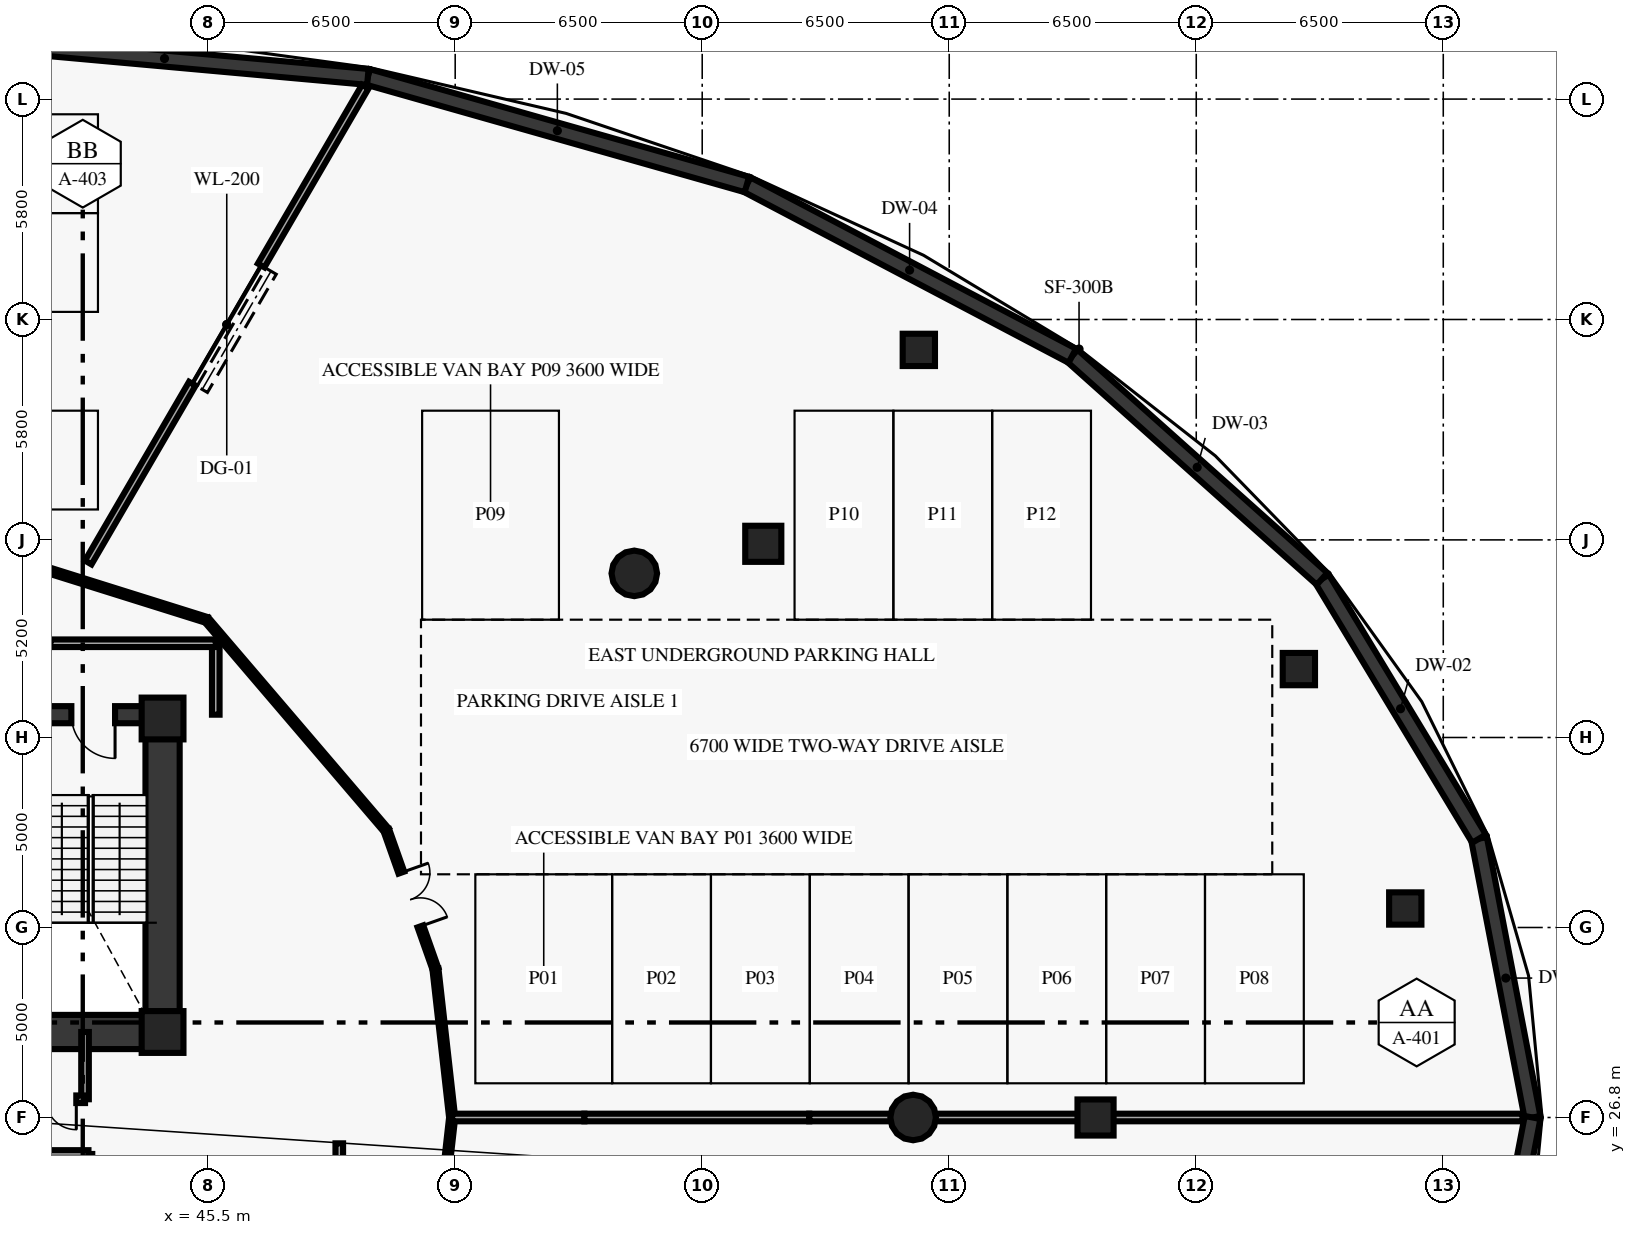
"""IFC4 building model, lengths in metres.
Left out: names, types, materials, properties, quantities, classifications, styles, units other than length and angle.
Written with IfcOpenShell. Run it as: python <this file> out.ifc"""

import sys

from ifc_helpers import new_model, si_unit, direction, frame, frame_2d, origin, origin_2d, place, context, subcontext, project, spatial, rectangle, circle, extrude, element, fill, save


model = new_model("IFC4")
c1 = context("Model", 3, precision=1e-05, world=origin(), true_north=direction((0.0, 1.0)))
c2 = subcontext(c1, "Body", "Model", "MODEL_VIEW")
j1 = project(units=[si_unit("LENGTHUNIT", "METRE"), si_unit("PLANEANGLEUNIT", "RADIAN")], contexts=[c1])
p1 = place(None, origin())
s1 = spatial("IfcSite", under=j1, at=p1, CompositionType="ELEMENT")
p2 = place(p1, origin())
s2 = spatial("IfcBuilding", under=s1, at=p2, CompositionType="ELEMENT")
p3 = place(p2, frame((0.0, 0.0, -4.5)))
s3 = spatial("IfcBuildingStorey", under=s2, at=p3, CompositionType="ELEMENT", Elevation=-4.5)
for number, where, z_axis, x_axis in (
    (1, (44.3, 29.05, 0.0), (0.0, 0.0, 1.0), (1.0, 0.0, 0.0)),
    (2, (44.3, 37.3, 0.0), (0.0, 0.0, 1.0), (1.0, 0.0, 0.0)),
):
    element("IfcColumn", number, at=place(p3, frame(where, z_axis=z_axis, x_axis=x_axis)), inside=s3, PredefinedType="PILASTER", context=c2, shape_type="SweptSolid", body=[
        extrude(rectangle(XDim=1.1, YDim=1.1, at=origin_2d()), origin(), (0.0, 0.0, 1.0), 4.18),
    ])
for number, where, z_axis, x_axis in (
    (3, (64.05, 26.8, 0.0), (0.0, 0.0, 1.0), (1.0, 0.0, 0.0)),
    (4, (56.713, 41.119, 0.0), (0.0, 0.0, 1.0), (1.0, 0.0, 0.0)),
):
    element("IfcColumn", number, at=place(p3, frame(where, z_axis=z_axis, x_axis=x_axis)), inside=s3, PredefinedType="COLUMN", context=c2, shape_type="SweptSolid", body=[
        extrude(circle(Radius=0.6, at=origin_2d()), origin(), (0.0, 0.0, 1.0), 4.18),
    ])
for number, where, z_axis, x_axis in (
    (5, (68.85, 26.8, 0.0), (0.0, 0.0, 1.0), (1.0, 0.0, 0.0)),
    (6, (60.107, 41.897, 0.0), (0.0, 0.0, 1.0), (1.0, 0.0, 0.0)),
):
    element("IfcColumn", number, at=place(p3, frame(where, z_axis=z_axis, x_axis=x_axis)), inside=s3, PredefinedType="COLUMN", context=c2, shape_type="SweptSolid", body=[
        extrude(rectangle(XDim=0.95, YDim=0.95, at=origin_2d()), origin(), (0.0, 0.0, 1.0), 4.18),
    ])
for number, where, z_axis, x_axis in (
    (7, (77.0, 32.3, 0.0), (0.0, 0.0, 1.0), (1.0, 0.0, 0.0)),
    (8, (74.2, 38.6, 0.0), (0.0, 0.0, 1.0), (1.0, 0.0, 0.0)),
    (9, (64.2, 47.0, 0.0), (0.0, 0.0, 1.0), (1.0, 0.0, 0.0)),
):
    element("IfcColumn", number, at=place(p3, frame(where, z_axis=z_axis, x_axis=x_axis)), inside=s3, PredefinedType="COLUMN", context=c2, shape_type="SweptSolid", body=[
        extrude(rectangle(XDim=0.85, YDim=0.85, at=origin_2d()), origin(), (0.0, 0.0, 1.0), 4.18),
    ])
p4 = place(p3, frame((44.3, 29.05, 0.0), z_axis=(0.0, 0.0, 1.0), x_axis=(0.0, 1.0, 0.0)))
e10 = element("IfcWall", 10, at=p4, inside=s3, PredefinedType="SHEAR", context=c2, shape_type="SweptSolid", body=[
    extrude(rectangle(XDim=8.35, YDim=0.9, at=frame_2d((4.175, 0.0))), origin(), (0.0, 0.0, 1.0), 4.18),
])
p5 = place(p3, frame((33.7, 29.05, 0.0), z_axis=(0.0, 0.0, 1.0), x_axis=(1.0, 0.0, 0.0)))
e11 = element("IfcWall", 11, at=p5, inside=s3, PredefinedType="SHEAR", context=c2, shape_type="SweptSolid", body=[
    extrude(rectangle(XDim=10.6, YDim=0.9, at=frame_2d((5.3, 0.0))), origin(), (0.0, 0.0, 1.0), 4.18),
])
p6 = place(p3, frame((80.35, 26.8, 0.0), z_axis=(0.0, 0.0, 1.0), x_axis=(-0.188595316219, 0.982054889861, 0.0)))
e12 = element("IfcWall", 12, at=p6, inside=s3, PredefinedType="SHEAR", context=c2, shape_type="SweptSolid", body=[
    extrude(rectangle(XDim=7.472, YDim=0.42, at=frame_2d((3.736, 0.0))), origin(), (0.0, 0.0, 1.0), 4.18),
])
p7 = place(p3, frame((78.941, 34.138, 0.0), z_axis=(0.0, 0.0, 1.0), x_axis=(-0.517122636798, 0.85591131463, 0.0)))
e13 = element("IfcWall", 13, at=p7, inside=s3, PredefinedType="SHEAR", context=c2, shape_type="SweptSolid", body=[
    extrude(rectangle(XDim=7.988, YDim=0.42, at=frame_2d((3.994, 0.0))), origin(), (0.0, 0.0, 1.0), 4.18),
])
p8 = place(p3, frame((74.81, 40.975, 0.0), z_axis=(0.0, 0.0, 1.0), x_axis=(-0.745720826992, 0.666258544554, 0.0)))
e14 = element("IfcWall", 14, at=p8, inside=s3, PredefinedType="SHEAR", context=c2, shape_type="SweptSolid", body=[
    extrude(rectangle(XDim=8.812, YDim=0.42, at=frame_2d((4.406, 0.0))), origin(), (0.0, 0.0, 1.0), 4.18),
])
p9 = place(p3, frame((68.239, 46.846, 0.0), z_axis=(0.0, 0.0, 1.0), x_axis=(-0.884971300821, 0.465645569852, 0.0)))
e15 = element("IfcWall", 15, at=p9, inside=s3, PredefinedType="SHEAR", context=c2, shape_type="SweptSolid", body=[
    extrude(rectangle(XDim=9.677, YDim=0.42, at=frame_2d((4.838, 0.0))), origin(), (0.0, 0.0, 1.0), 4.18),
])
p10 = place(p3, frame((59.675, 51.352, 0.0), z_axis=(0.0, 0.0, 1.0), x_axis=(-0.961967006375, 0.273165661541, 0.0)))
e16 = element("IfcWall", 16, at=p10, inside=s3, PredefinedType="SHEAR", context=c2, shape_type="SweptSolid", body=[
    extrude(rectangle(XDim=10.367, YDim=0.42, at=frame_2d((5.184, 0.0))), origin(), (0.0, 0.0, 1.0), 4.18),
])
p11 = place(p3, frame((49.702, 54.184, 0.0), z_axis=(0.0, 0.0, 1.0), x_axis=(-0.995952400538, 0.089882233296, 0.0)))
e17 = element("IfcWall", 17, at=p11, inside=s3, PredefinedType="SHEAR", context=c2, shape_type="SweptSolid", body=[
    extrude(rectangle(XDim=10.745, YDim=0.42, at=frame_2d((5.373, 0.0))), origin(), (0.0, 0.0, 1.0), 4.18),
])
p12 = place(p3, frame((78.941, 19.462, 0.0), z_axis=(0.0, 0.0, 1.0), x_axis=(0.188589264795, 0.982056051966, 0.0)))
e18 = element("IfcWall", 18, at=p12, inside=s3, PredefinedType="SHEAR", context=c2, shape_type="SweptSolid", body=[
    extrude(rectangle(XDim=7.472, YDim=0.42, at=frame_2d((3.736, 0.0))), origin(), (0.0, 0.0, 1.0), 4.18),
])
p13 = place(p3, frame((44.3, 37.4, 0.0), z_axis=(0.0, 0.0, 1.0), x_axis=(-1.0, 0.0, 0.0)))
e19 = element("IfcWall", 19, at=p13, inside=s3, PredefinedType="SHEAR", context=c2, shape_type="SweptSolid", body=[
    extrude(rectangle(XDim=3.65, YDim=0.45, at=frame_2d((1.825, 0.0))), origin(), (0.0, 0.0, 1.0), 4.18),
])
p14 = place(p13, frame((1.25, 0.0, 0.0)))
e20 = element("IfcOpeningElement", 20, at=p14, cuts=e19, PredefinedType="OPENING", context=c2, shape_type="SweptSolid", body=[
    extrude(rectangle(XDim=1.15, YDim=2.15, at=frame_2d((0.575, 1.075))), frame((0.0, 0.235, 0.0), z_axis=(0.0, -1.0, 0.0), x_axis=(1.0, 0.0, 0.0)), (0.0, 0.0, 1.0), 0.47),
])
p15 = place(p3, frame((45.7, 37.4, 0.0), z_axis=(0.0, 0.0, 1.0), x_axis=(0.0, 1.0, 0.0)))
e21 = element("IfcWall", 21, at=p15, inside=s3, PredefinedType="SOLIDWALL", context=c2, shape_type="SweptSolid", body=[
    extrude(rectangle(XDim=1.88, YDim=0.2, at=frame_2d((0.94, 0.0))), origin(), (0.0, 0.0, 1.0), 4.18),
])
p16 = place(p3, frame((45.7, 39.28, 0.0), z_axis=(0.0, 0.0, 1.0), x_axis=(-1.0, 0.0, 0.0)))
e22 = element("IfcWall", 22, at=p16, inside=s3, PredefinedType="SOLIDWALL", context=c2, shape_type="SweptSolid", body=[
    extrude(rectangle(XDim=6.6, YDim=0.2, at=frame_2d((3.3, 0.0))), origin(), (0.0, 0.0, 1.0), 4.18),
])
p17 = place(p16, frame((4.35, 0.0, 0.0)))
e23 = element("IfcOpeningElement", 23, at=p17, cuts=e22, PredefinedType="OPENING", context=c2, shape_type="SweptSolid", body=[
    extrude(rectangle(XDim=1.6, YDim=2.2, at=frame_2d((0.8, 1.1))), frame((0.0, 0.11, 0.0), z_axis=(0.0, -1.0, 0.0), x_axis=(1.0, 0.0, 0.0)), (0.0, 0.0, 1.0), 0.22),
])
p18 = place(p3, frame((42.26, 27.28, 0.0), z_axis=(0.0, 0.0, 1.0), x_axis=(0.0, 1.0, 0.0)))
e24 = element("IfcWall", 24, at=p18, inside=s3, PredefinedType="SOLIDWALL", context=c2, shape_type="SweptSolid", body=[
    extrude(rectangle(XDim=1.77, YDim=0.2, at=frame_2d((0.885, 0.0))), origin(), (0.0, 0.0, 1.0), 4.18),
])
p19 = place(p3, frame((41.0, 27.28, 0.0), z_axis=(0.0, 0.0, 1.0), x_axis=(1.0, 0.0, 0.0)))
e25 = element("IfcWall", 25, at=p19, inside=s3, PredefinedType="SOLIDWALL", context=c2, shape_type="SweptSolid", body=[
    extrude(rectangle(XDim=1.26, YDim=0.2, at=frame_2d((0.63, 0.0))), origin(), (0.0, 0.0, 1.0), 4.18),
])
p20 = place(p19, frame((0.23, 0.0, 0.0)))
e26 = element("IfcOpeningElement", 26, at=p20, cuts=e25, PredefinedType="OPENING", context=c2, shape_type="SweptSolid", body=[
    extrude(rectangle(XDim=0.8, YDim=2.05, at=frame_2d((0.4, 1.025))), frame((0.0, 0.11, 0.0), z_axis=(0.0, -1.0, 0.0), x_axis=(1.0, 0.0, 0.0)), (0.0, 0.0, 1.0), 0.22),
])
p21 = place(p3, frame((48.95, 19.05, 0.0), z_axis=(0.0, 0.0, 1.0), x_axis=(0.0, 1.0, 0.0)))
e27 = element("IfcWall", 27, at=p21, inside=s3, PredefinedType="SOLIDWALL", context=c2, shape_type="SweptSolid", body=[
    extrude(rectangle(XDim=7.07, YDim=0.2, at=frame_2d((3.535, 0.0))), origin(), (0.0, 0.0, 1.0), 4.18),
])
p22 = place(p21, frame((2.785, 0.0, 0.0)))
e28 = element("IfcOpeningElement", 28, at=p22, cuts=e27, PredefinedType="OPENING", context=c2, shape_type="SweptSolid", body=[
    extrude(rectangle(XDim=1.5, YDim=2.2, at=frame_2d((0.75, 1.1))), frame((0.0, 0.11, 0.0), z_axis=(0.0, -1.0, 0.0), x_axis=(1.0, 0.0, 0.0)), (0.0, 0.0, 1.0), 0.22),
])
p23 = place(p3, frame((42.35, 21.35, 0.0), z_axis=(0.0, 0.0, 1.0), x_axis=(0.0, 1.0, 0.0)))
e29 = element("IfcWall", 29, at=p23, inside=s3, PredefinedType="SOLIDWALL", context=c2, shape_type="SweptSolid", body=[
    extrude(rectangle(XDim=4.49, YDim=0.2, at=frame_2d((2.245, 0.0))), origin(), (0.0, 0.0, 1.0), 4.18),
])
p24 = place(p3, frame((42.35, 25.84, 0.0), z_axis=(0.0, 0.0, 1.0), x_axis=(-1.0, 0.0, 0.0)))
e30 = element("IfcWall", 30, at=p24, inside=s3, PredefinedType="SOLIDWALL", context=c2, shape_type="SweptSolid", body=[
    extrude(rectangle(XDim=8.65, YDim=0.2, at=frame_2d((4.325, 0.0))), origin(), (0.0, 0.0, 1.0), 4.18),
])
p25 = place(p24, frame((3.575, 0.0, 0.0)))
e31 = element("IfcOpeningElement", 31, at=p25, cuts=e30, PredefinedType="OPENING", context=c2, shape_type="SweptSolid", body=[
    extrude(rectangle(XDim=1.5, YDim=2.2, at=frame_2d((0.75, 1.1))), frame((0.0, 0.11, 0.0), z_axis=(0.0, -1.0, 0.0), x_axis=(1.0, 0.0, 0.0)), (0.0, 0.0, 1.0), 0.22),
])
p26 = place(p3, frame((51.92, 26.8, 0.0), z_axis=(0.0, 0.0, 1.0), x_axis=(-0.111731247657, 0.993738460711, 0.0)))
e32 = element("IfcWall", 32, at=p26, inside=s3, PredefinedType="PARTITIONING", context=c2, shape_type="SweptSolid", body=[
    extrude(rectangle(XDim=3.938, YDim=0.16, at=frame_2d((1.969, 0.0))), origin(), (0.0, 0.0, 1.0), 4.18),
])
p27 = place(p3, frame((50.189, 34.36, 0.0), z_axis=(0.0, 0.0, 1.0), x_axis=(0.333684770033, -0.942684716248, 0.0)))
e33 = element("IfcWall", 33, at=p27, inside=s3, PredefinedType="PARTITIONING", context=c2, shape_type="SweptSolid", body=[
    extrude(rectangle(XDim=3.869, YDim=0.16, at=frame_2d((1.935, 0.0))), origin(), (0.0, 0.0, 1.0), 4.18),
])
p28 = place(p27, frame((1.184, 0.0, 0.0)))
e34 = element("IfcOpeningElement", 34, at=p28, cuts=e33, PredefinedType="OPENING", context=c2, shape_type="SweptSolid", body=[
    extrude(rectangle(XDim=1.5, YDim=2.2, at=frame_2d((0.75, 1.1))), frame((0.0, 0.09, 0.0), z_axis=(0.0, -1.0, 0.0), x_axis=(1.0, 0.0, 0.0)), (0.0, 0.0, 1.0), 0.18),
])
p29 = place(p3, frame((50.189, 34.36, 0.0), z_axis=(0.0, 0.0, 1.0), x_axis=(-0.649652680018, 0.760231145998, 0.0)))
e35 = element("IfcWall", 35, at=p29, inside=s3, PredefinedType="PARTITIONING", context=c2, shape_type="SweptSolid", body=[
    extrude(rectangle(XDim=7.279, YDim=0.16, at=frame_2d((3.64, 0.0))), origin(), (0.0, 0.0, 1.0), 4.18),
])
p30 = place(p3, frame((45.46, 39.894, 0.0), z_axis=(0.0, 0.0, 1.0), x_axis=(-0.95417919824, 0.29923578938, 0.0)))
e36 = element("IfcWall", 36, at=p30, inside=s3, PredefinedType="PARTITIONING", context=c2, shape_type="SweptSolid", body=[
    extrude(rectangle(XDim=6.77, YDim=0.16, at=frame_2d((3.385, 0.0))), origin(), (0.0, 0.0, 1.0), 4.18),
])
p31 = place(p3, frame((51.92, 26.8, 0.0), z_axis=(0.0, 0.0, 1.0), x_axis=(-0.111724363671, -0.99373923469, 0.0)))
e37 = element("IfcWall", 37, at=p31, inside=s3, PredefinedType="PARTITIONING", context=c2, shape_type="SweptSolid", body=[
    extrude(rectangle(XDim=3.938, YDim=0.16, at=frame_2d((1.969, 0.0))), origin(), (0.0, 0.0, 1.0), 4.18),
])
p32 = place(p31, frame((1.219, 0.0, 0.0)))
e38 = element("IfcOpeningElement", 38, at=p32, cuts=e37, PredefinedType="OPENING", context=c2, shape_type="SweptSolid", body=[
    extrude(rectangle(XDim=1.5, YDim=2.2, at=frame_2d((0.75, 1.1))), frame((0.0, 0.09, 0.0), z_axis=(0.0, -1.0, 0.0), x_axis=(1.0, 0.0, 0.0)), (0.0, 0.0, 1.0), 0.18),
])
p33 = place(p3, frame((51.92, 26.8, 0.0), z_axis=(0.0, 0.0, 1.0), x_axis=(1.0, 0.0, 0.0)))
e39 = element("IfcWall", 39, at=p33, inside=s3, PredefinedType="SOLIDWALL", context=c2, shape_type="SweptSolid", body=[
    extrude(rectangle(XDim=3.48, YDim=0.2, at=frame_2d((1.74, 0.0))), origin(), (0.0, 0.0, 1.0), 4.18),
])
p34 = place(p3, frame((55.4, 26.8, 0.0), z_axis=(0.0, 0.0, 1.0), x_axis=(1.0, 0.0, 0.0)))
e40 = element("IfcWall", 40, at=p34, inside=s3, PredefinedType="SOLIDWALL", context=c2, shape_type="SweptSolid", body=[
    extrude(rectangle(XDim=5.917, YDim=0.2, at=frame_2d((2.958, 0.0))), origin(), (0.0, 0.0, 1.0), 4.18),
])
p35 = place(p3, frame((61.317, 26.8, 0.0), z_axis=(0.0, 0.0, 1.0), x_axis=(1.0, 0.0, 0.0)))
e41 = element("IfcWall", 41, at=p35, inside=s3, PredefinedType="SOLIDWALL", context=c2, shape_type="SweptSolid", body=[
    extrude(rectangle(XDim=7.533, YDim=0.2, at=frame_2d((3.767, 0.0))), origin(), (0.0, 0.0, 1.0), 3.14),
])
p36 = place(p3, frame((68.85, 26.8, 0.0), z_axis=(0.0, 0.0, 1.0), x_axis=(1.0, 0.0, 0.0)))
e42 = element("IfcWall", 42, at=p36, inside=s3, PredefinedType="SOLIDWALL", context=c2, shape_type="SweptSolid", body=[
    extrude(rectangle(XDim=11.235, YDim=0.2, at=frame_2d((5.617, 0.0))), origin(), (0.0, 0.0, 1.0), 4.18),
])
p37 = place(p3, frame((42.344, 41.405, 0.0), z_axis=(0.0, 0.0, 1.0), x_axis=(0.503097710949, 0.864229537355, 0.0)))
e43 = element("IfcWall", 43, at=p37, inside=s3, PredefinedType="SOLIDWALL", context=c2, shape_type="SweptSolid", body=[
    extrude(rectangle(XDim=14.49, YDim=0.2, at=frame_2d((7.245, 0.0))), origin(), (0.0, 0.0, 1.0), 4.18),
])
p38 = place(p37, frame((5.445, 0.0, 0.0)))
e44 = element("IfcOpeningElement", 44, at=p38, cuts=e43, PredefinedType="OPENING", context=c2, shape_type="SweptSolid", body=[
    extrude(rectangle(XDim=3.6, YDim=2.4, at=frame_2d((1.8, 1.2))), frame((0.0, 0.11, 0.0), z_axis=(0.0, -1.0, 0.0), x_axis=(1.0, 0.0, 0.0)), (0.0, 0.0, 1.0), 0.22),
])
p39 = place(p14, origin())
e45 = element("IfcDoor", 45, at=p39, inside=s3, OperationType="SINGLE_SWING_LEFT", PredefinedType="DOOR", context=c2, shape_type="SweptSolid", body=[
    extrude(rectangle(XDim=1.15, YDim=2.15, at=frame_2d((0.575, 1.075))), frame((0.0, 0.025, 0.0), z_axis=(0.0, -1.0, 0.0), x_axis=(1.0, 0.0, 0.0)), (0.0, 0.0, 1.0), 0.05),
])
fill(e20, e45)
p40 = place(p20, origin())
e46 = element("IfcDoor", 46, at=p40, inside=s3, OperationType="SINGLE_SWING_RIGHT", PredefinedType="DOOR", context=c2, shape_type="SweptSolid", body=[
    extrude(rectangle(XDim=0.8, YDim=2.05, at=frame_2d((0.4, 1.025))), frame((0.0, 0.025, 0.0), z_axis=(0.0, -1.0, 0.0), x_axis=(1.0, 0.0, 0.0)), (0.0, 0.0, 1.0), 0.05),
])
fill(e26, e46)
p41 = place(p28, origin())
e47 = element("IfcDoor", 47, at=p41, inside=s3, OperationType="DOUBLE_DOOR_SINGLE_SWING", PredefinedType="DOOR", context=c2, shape_type="SweptSolid", body=[
    extrude(rectangle(XDim=1.5, YDim=2.2, at=frame_2d((0.75, 1.1))), frame((0.0, 0.025, 0.0), z_axis=(0.0, -1.0, 0.0), x_axis=(1.0, 0.0, 0.0)), (0.0, 0.0, 1.0), 0.05),
])
fill(e34, e47)
p42 = place(p38, origin())
e48 = element("IfcDoor", 48, at=p42, inside=s3, OperationType="ROLLINGUP", PredefinedType="GATE", context=c2, shape_type="SweptSolid", body=[
    extrude(rectangle(XDim=3.6, YDim=2.4, at=frame_2d((1.8, 1.2))), frame((0.0, 0.025, 0.0), z_axis=(0.0, -1.0, 0.0), x_axis=(1.0, 0.0, 0.0)), (0.0, 0.0, 1.0), 0.05),
])
fill(e44, e48)
save(model, sys.argv[1])
